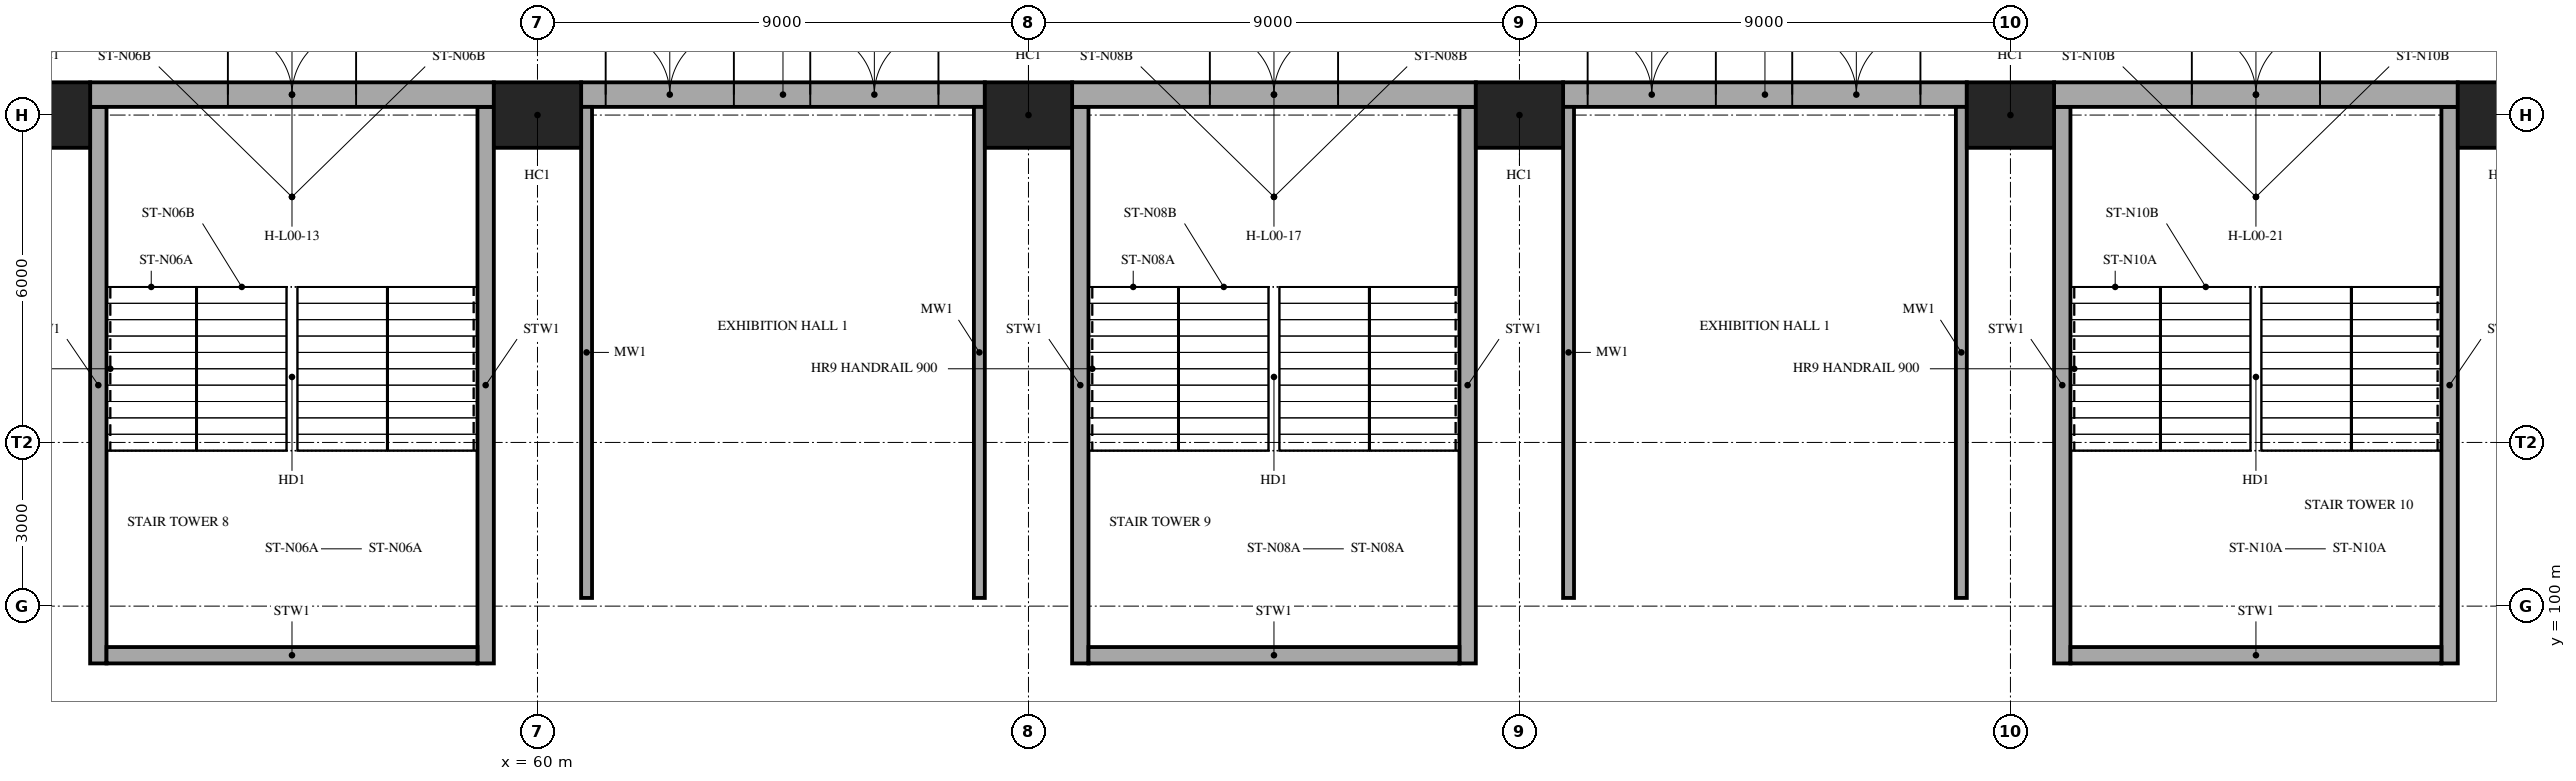
"""IFC4 building model, lengths in metres.
Left out: names, types, materials, properties, quantities, classifications, styles, units other than length and angle.
Written with IfcOpenShell. Run it as: python <this file> out.ifc"""

import sys

from ifc_helpers import new_model, si_unit, direction, frame, frame_2d, origin, origin_2d, place, context, subcontext, project, spatial, rectangle, extrude, element, fill, save


model = new_model("IFC4")
c1 = context("Model", 3, precision=1e-05, world=origin(), true_north=direction((0.0, 1.0)))
c2 = subcontext(c1, "Body", "Model", "MODEL_VIEW")
j1 = project(units=[si_unit("LENGTHUNIT", "METRE"), si_unit("PLANEANGLEUNIT", "RADIAN")], contexts=[c1])
p1 = place(None, origin())
s1 = spatial("IfcSite", under=j1, at=p1, CompositionType="ELEMENT")
p2 = place(p1, origin())
s2 = spatial("IfcBuilding", under=s1, at=p2, CompositionType="ELEMENT")
p3 = place(p2, origin())
s3 = spatial("IfcBuildingStorey", under=s2, at=p3, CompositionType="ELEMENT", Elevation=0.0)
for number, where, z_axis, x_axis in (
    (1, (51.0, 109.0, 0.0), (0.0, 0.0, 1.0), (1.0, 0.0, 0.0)),
    (2, (60.0, 109.0, 0.0), (0.0, 0.0, 1.0), (1.0, 0.0, 0.0)),
    (3, (69.0, 109.0, 0.0), (0.0, 0.0, 1.0), (1.0, 0.0, 0.0)),
    (4, (78.0, 109.0, 0.0), (0.0, 0.0, 1.0), (1.0, 0.0, 0.0)),
    (5, (87.0, 109.0, 0.0), (0.0, 0.0, 1.0), (1.0, 0.0, 0.0)),
    (6, (96.0, 109.0, 0.0), (0.0, 0.0, 1.0), (1.0, 0.0, 0.0)),
):
    element("IfcColumn", number, at=place(p3, frame(where, z_axis=z_axis, x_axis=x_axis)), inside=s3, PredefinedType="COLUMN", context=c2, shape_type="SweptSolid", body=[
        extrude(rectangle(XDim=1.6, YDim=1.2, at=origin_2d()), origin(), (0.0, 0.0, 1.0), 5.0),
    ])
for number, where, z_axis, x_axis in (
    (7, (51.95, 109.15, 0.0), (0.0, 0.0, 1.0), (0.0, -1.0, 0.0)),
    (8, (59.05, 109.15, 0.0), (0.0, 0.0, 1.0), (0.0, -1.0, 0.0)),
):
    element("IfcWall", number, at=place(p3, frame(where, z_axis=z_axis, x_axis=x_axis)), inside=s3, PredefinedType="SHEAR", context=c2, shape_type="SweptSolid", body=[
        extrude(rectangle(XDim=10.2, YDim=0.3, at=frame_2d((5.1, 0.0))), origin(), (0.0, 0.0, 1.0), 5.0),
    ])
p4 = place(p3, frame((52.1, 99.1, 0.0), z_axis=(0.0, 0.0, 1.0), x_axis=(1.0, 0.0, 0.0)))
e9 = element("IfcWall", 9, at=p4, inside=s3, PredefinedType="SHEAR", context=c2, shape_type="SweptSolid", body=[
    extrude(rectangle(XDim=6.8, YDim=0.3, at=frame_2d((3.4, 0.0))), origin(), (0.0, 0.0, 1.0), 5.0),
])
for number, where, z_axis, x_axis in (
    (10, (69.95, 109.15, 0.0), (0.0, 0.0, 1.0), (0.0, -1.0, 0.0)),
    (11, (77.05, 109.15, 0.0), (0.0, 0.0, 1.0), (0.0, -1.0, 0.0)),
):
    element("IfcWall", number, at=place(p3, frame(where, z_axis=z_axis, x_axis=x_axis)), inside=s3, PredefinedType="SHEAR", context=c2, shape_type="SweptSolid", body=[
        extrude(rectangle(XDim=10.2, YDim=0.3, at=frame_2d((5.1, 0.0))), origin(), (0.0, 0.0, 1.0), 5.0),
    ])
p5 = place(p3, frame((70.1, 99.1, 0.0), z_axis=(0.0, 0.0, 1.0), x_axis=(1.0, 0.0, 0.0)))
e12 = element("IfcWall", 12, at=p5, inside=s3, PredefinedType="SHEAR", context=c2, shape_type="SweptSolid", body=[
    extrude(rectangle(XDim=6.8, YDim=0.3, at=frame_2d((3.4, 0.0))), origin(), (0.0, 0.0, 1.0), 5.0),
])
for number, where, z_axis, x_axis in (
    (13, (87.95, 109.15, 0.0), (0.0, 0.0, 1.0), (0.0, -1.0, 0.0)),
    (14, (95.05, 109.15, 0.0), (0.0, 0.0, 1.0), (0.0, -1.0, 0.0)),
):
    element("IfcWall", number, at=place(p3, frame(where, z_axis=z_axis, x_axis=x_axis)), inside=s3, PredefinedType="SHEAR", context=c2, shape_type="SweptSolid", body=[
        extrude(rectangle(XDim=10.2, YDim=0.3, at=frame_2d((5.1, 0.0))), origin(), (0.0, 0.0, 1.0), 5.0),
    ])
p6 = place(p3, frame((88.1, 99.1, 0.0), z_axis=(0.0, 0.0, 1.0), x_axis=(1.0, 0.0, 0.0)))
e15 = element("IfcWall", 15, at=p6, inside=s3, PredefinedType="SHEAR", context=c2, shape_type="SweptSolid", body=[
    extrude(rectangle(XDim=6.8, YDim=0.3, at=frame_2d((3.4, 0.0))), origin(), (0.0, 0.0, 1.0), 5.0),
])
p7 = place(p3, frame((51.8, 109.375, 0.0), z_axis=(0.0, 0.0, 1.0), x_axis=(1.0, 0.0, 0.0)))
e16 = element("IfcWall", 16, at=p7, inside=s3, PredefinedType="SOLIDWALL", context=c2, shape_type="SweptSolid", body=[
    extrude(rectangle(XDim=7.4, YDim=0.45, at=frame_2d((3.7, 0.0))), origin(), (0.0, 0.0, 1.0), 5.0),
])
p8 = place(p7, frame((2.525, 0.0, 0.0)))
e17 = element("IfcOpeningElement", 17, at=p8, cuts=e16, PredefinedType="OPENING", context=c2, shape_type="SweptSolid", body=[
    extrude(rectangle(XDim=2.35, YDim=2.1, at=frame_2d((1.175, 1.05))), frame((0.0, 0.235, 0.0), z_axis=(0.0, -1.0, 0.0), x_axis=(1.0, 0.0, 0.0)), (0.0, 0.0, 1.0), 0.47),
])
p9 = place(p3, frame((60.8, 109.375, 0.0), z_axis=(0.0, 0.0, 1.0), x_axis=(1.0, 0.0, 0.0)))
e18 = element("IfcWall", 18, at=p9, inside=s3, PredefinedType="SOLIDWALL", context=c2, shape_type="SweptSolid", body=[
    extrude(rectangle(XDim=7.4, YDim=0.45, at=frame_2d((3.7, 0.0))), origin(), (0.0, 0.0, 1.0), 5.0),
])
p10 = place(p9, frame((0.45, 0.0, 0.0)))
e19 = element("IfcOpeningElement", 19, at=p10, cuts=e18, PredefinedType="OPENING", context=c2, shape_type="SweptSolid", body=[
    extrude(rectangle(XDim=2.35, YDim=2.4, at=frame_2d((1.175, 1.2))), frame((0.0, 0.235, 0.0), z_axis=(0.0, -1.0, 0.0), x_axis=(1.0, 0.0, 0.0)), (0.0, 0.0, 1.0), 0.47),
])
p11 = place(p9, frame((4.2, 0.0, 0.0)))
e20 = element("IfcOpeningElement", 20, at=p11, cuts=e18, PredefinedType="OPENING", context=c2, shape_type="SweptSolid", body=[
    extrude(rectangle(XDim=2.35, YDim=2.4, at=frame_2d((1.175, 1.2))), frame((0.0, 0.235, 0.0), z_axis=(0.0, -1.0, 0.0), x_axis=(1.0, 0.0, 0.0)), (0.0, 0.0, 1.0), 0.47),
])
p12 = place(p3, frame((69.8, 109.375, 0.0), z_axis=(0.0, 0.0, 1.0), x_axis=(1.0, 0.0, 0.0)))
e21 = element("IfcWall", 21, at=p12, inside=s3, PredefinedType="SOLIDWALL", context=c2, shape_type="SweptSolid", body=[
    extrude(rectangle(XDim=7.4, YDim=0.45, at=frame_2d((3.7, 0.0))), origin(), (0.0, 0.0, 1.0), 5.0),
])
p13 = place(p12, frame((2.525, 0.0, 0.0)))
e22 = element("IfcOpeningElement", 22, at=p13, cuts=e21, PredefinedType="OPENING", context=c2, shape_type="SweptSolid", body=[
    extrude(rectangle(XDim=2.35, YDim=2.1, at=frame_2d((1.175, 1.05))), frame((0.0, 0.235, 0.0), z_axis=(0.0, -1.0, 0.0), x_axis=(1.0, 0.0, 0.0)), (0.0, 0.0, 1.0), 0.47),
])
p14 = place(p3, frame((78.8, 109.375, 0.0), z_axis=(0.0, 0.0, 1.0), x_axis=(1.0, 0.0, 0.0)))
e23 = element("IfcWall", 23, at=p14, inside=s3, PredefinedType="SOLIDWALL", context=c2, shape_type="SweptSolid", body=[
    extrude(rectangle(XDim=7.4, YDim=0.45, at=frame_2d((3.7, 0.0))), origin(), (0.0, 0.0, 1.0), 5.0),
])
p15 = place(p14, frame((0.45, 0.0, 0.0)))
e24 = element("IfcOpeningElement", 24, at=p15, cuts=e23, PredefinedType="OPENING", context=c2, shape_type="SweptSolid", body=[
    extrude(rectangle(XDim=2.35, YDim=2.4, at=frame_2d((1.175, 1.2))), frame((0.0, 0.235, 0.0), z_axis=(0.0, -1.0, 0.0), x_axis=(1.0, 0.0, 0.0)), (0.0, 0.0, 1.0), 0.47),
])
p16 = place(p14, frame((4.2, 0.0, 0.0)))
e25 = element("IfcOpeningElement", 25, at=p16, cuts=e23, PredefinedType="OPENING", context=c2, shape_type="SweptSolid", body=[
    extrude(rectangle(XDim=2.35, YDim=2.4, at=frame_2d((1.175, 1.2))), frame((0.0, 0.235, 0.0), z_axis=(0.0, -1.0, 0.0), x_axis=(1.0, 0.0, 0.0)), (0.0, 0.0, 1.0), 0.47),
])
p17 = place(p3, frame((87.8, 109.375, 0.0), z_axis=(0.0, 0.0, 1.0), x_axis=(1.0, 0.0, 0.0)))
e26 = element("IfcWall", 26, at=p17, inside=s3, PredefinedType="SOLIDWALL", context=c2, shape_type="SweptSolid", body=[
    extrude(rectangle(XDim=7.4, YDim=0.45, at=frame_2d((3.7, 0.0))), origin(), (0.0, 0.0, 1.0), 5.0),
])
p18 = place(p17, frame((2.525, 0.0, 0.0)))
e27 = element("IfcOpeningElement", 27, at=p18, cuts=e26, PredefinedType="OPENING", context=c2, shape_type="SweptSolid", body=[
    extrude(rectangle(XDim=2.35, YDim=2.1, at=frame_2d((1.175, 1.05))), frame((0.0, 0.235, 0.0), z_axis=(0.0, -1.0, 0.0), x_axis=(1.0, 0.0, 0.0)), (0.0, 0.0, 1.0), 0.47),
])
for number, where, z_axis, x_axis in (
    (28, (60.9, 100.15, 0.0), (0.0, 0.0, 1.0), (0.0, 1.0, 0.0)),
    (29, (68.1, 100.15, 0.0), (0.0, 0.0, 1.0), (0.0, 1.0, 0.0)),
    (30, (78.9, 100.15, 0.0), (0.0, 0.0, 1.0), (0.0, 1.0, 0.0)),
    (31, (86.1, 100.15, 0.0), (0.0, 0.0, 1.0), (0.0, 1.0, 0.0)),
):
    element("IfcWall", number, at=place(p3, frame(where, z_axis=z_axis, x_axis=x_axis)), inside=s3, PredefinedType="SHEAR", context=c2, shape_type="SweptSolid", body=[
        extrude(rectangle(XDim=9.0, YDim=0.2, at=frame_2d((4.5, 0.0))), origin(), (0.0, 0.0, 1.0), 4.75),
    ])
p19 = place(p8, origin())
e32 = element("IfcDoor", 32, at=p19, inside=s3, OperationType="DOUBLE_DOOR_SINGLE_SWING", PredefinedType="DOOR", context=c2, shape_type="SweptSolid", body=[
    extrude(rectangle(XDim=2.35, YDim=2.1, at=frame_2d((1.175, 1.05))), frame((0.0, 0.025, 0.0), z_axis=(0.0, -1.0, 0.0), x_axis=(1.0, 0.0, 0.0)), (0.0, 0.0, 1.0), 0.05),
])
fill(e17, e32)
p20 = place(p10, origin())
e33 = element("IfcDoor", 33, at=p20, inside=s3, OperationType="DOUBLE_DOOR_SINGLE_SWING", PredefinedType="DOOR", context=c2, shape_type="SweptSolid", body=[
    extrude(rectangle(XDim=2.35, YDim=2.4, at=frame_2d((1.175, 1.2))), frame((0.0, 0.025, 0.0), z_axis=(0.0, -1.0, 0.0), x_axis=(1.0, 0.0, 0.0)), (0.0, 0.0, 1.0), 0.05),
])
fill(e19, e33)
p21 = place(p11, origin())
e34 = element("IfcDoor", 34, at=p21, inside=s3, OperationType="DOUBLE_DOOR_SINGLE_SWING", PredefinedType="DOOR", context=c2, shape_type="SweptSolid", body=[
    extrude(rectangle(XDim=2.35, YDim=2.4, at=frame_2d((1.175, 1.2))), frame((0.0, 0.025, 0.0), z_axis=(0.0, -1.0, 0.0), x_axis=(1.0, 0.0, 0.0)), (0.0, 0.0, 1.0), 0.05),
])
fill(e20, e34)
p22 = place(p13, origin())
e35 = element("IfcDoor", 35, at=p22, inside=s3, OperationType="DOUBLE_DOOR_SINGLE_SWING", PredefinedType="DOOR", context=c2, shape_type="SweptSolid", body=[
    extrude(rectangle(XDim=2.35, YDim=2.1, at=frame_2d((1.175, 1.05))), frame((0.0, 0.025, 0.0), z_axis=(0.0, -1.0, 0.0), x_axis=(1.0, 0.0, 0.0)), (0.0, 0.0, 1.0), 0.05),
])
fill(e22, e35)
p23 = place(p15, origin())
e36 = element("IfcDoor", 36, at=p23, inside=s3, OperationType="DOUBLE_DOOR_SINGLE_SWING", PredefinedType="DOOR", context=c2, shape_type="SweptSolid", body=[
    extrude(rectangle(XDim=2.35, YDim=2.4, at=frame_2d((1.175, 1.2))), frame((0.0, 0.025, 0.0), z_axis=(0.0, -1.0, 0.0), x_axis=(1.0, 0.0, 0.0)), (0.0, 0.0, 1.0), 0.05),
])
fill(e24, e36)
p24 = place(p16, origin())
e37 = element("IfcDoor", 37, at=p24, inside=s3, OperationType="DOUBLE_DOOR_SINGLE_SWING", PredefinedType="DOOR", context=c2, shape_type="SweptSolid", body=[
    extrude(rectangle(XDim=2.35, YDim=2.4, at=frame_2d((1.175, 1.2))), frame((0.0, 0.025, 0.0), z_axis=(0.0, -1.0, 0.0), x_axis=(1.0, 0.0, 0.0)), (0.0, 0.0, 1.0), 0.05),
])
fill(e25, e37)
p25 = place(p18, origin())
e38 = element("IfcDoor", 38, at=p25, inside=s3, OperationType="DOUBLE_DOOR_SINGLE_SWING", PredefinedType="DOOR", context=c2, shape_type="SweptSolid", body=[
    extrude(rectangle(XDim=2.35, YDim=2.1, at=frame_2d((1.175, 1.05))), frame((0.0, 0.025, 0.0), z_axis=(0.0, -1.0, 0.0), x_axis=(1.0, 0.0, 0.0)), (0.0, 0.0, 1.0), 0.05),
])
fill(e27, e38)
save(model, sys.argv[1])
